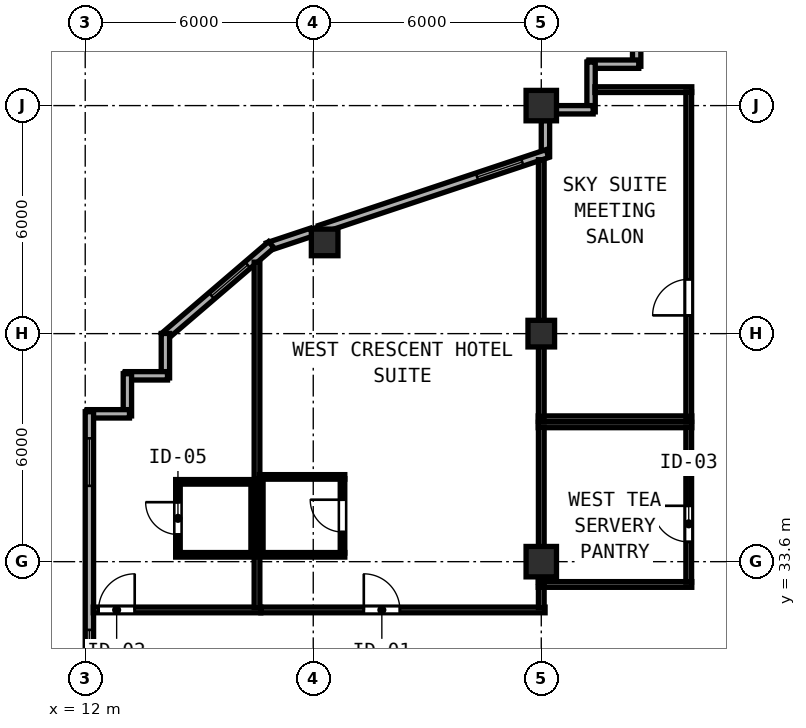
"""IFC4 building model, lengths in metres.
Left out: names, types, materials, properties, quantities, classifications, styles, units other than length and angle.
Written with IfcOpenShell. Run it as: python <this file> out.ifc"""

import sys

from ifc_helpers import new_model, si_unit, direction, frame, frame_2d, origin, origin_2d, place, context, subcontext, project, spatial, rectangle, hollow_rectangle, extrude, element, fill, save


model = new_model("IFC4")
c1 = context("Model", 3, precision=1e-05, world=origin(), true_north=direction((0.0, 1.0)))
c2 = subcontext(c1, "Body", "Model", "MODEL_VIEW")
j1 = project(units=[si_unit("LENGTHUNIT", "METRE"), si_unit("PLANEANGLEUNIT", "RADIAN")], contexts=[c1])
p1 = place(None, origin())
s1 = spatial("IfcSite", under=j1, at=p1, CompositionType="ELEMENT")
p2 = place(p1, origin())
s2 = spatial("IfcBuilding", under=s1, at=p2, CompositionType="ELEMENT")
p3 = place(p2, frame((0.0, 0.0, 262.15)))
s3 = spatial("IfcBuildingStorey", under=s2, at=p3, CompositionType="ELEMENT", Elevation=262.15)
for number, where, z_axis, x_axis in (
    (1, (24.0, 33.6, 0.0), (0.0, 0.0, 1.0), (1.0, 0.0, 0.0)),
    (2, (24.0, 45.6, 0.0), (0.0, 0.0, 1.0), (1.0, 0.0, 0.0)),
):
    element("IfcColumn", number, at=place(p3, frame(where, z_axis=z_axis, x_axis=x_axis)), inside=s3, PredefinedType="COLUMN", context=c2, shape_type="SweptSolid", body=[
        extrude(hollow_rectangle(XDim=0.8, YDim=0.8, WallThickness=0.03, at=origin_2d()), origin(), (0.0, 0.0, 1.0), 3.85),
    ])
for number, where, z_axis, x_axis in (
    (3, (24.0, 39.6, 0.0), (0.0, 0.0, 1.0), (1.0, 0.0, 0.0)),
    (4, (18.3, 42.0, 0.0), (0.0, 0.0, 1.0), (1.0, 0.0, 0.0)),
):
    element("IfcColumn", number, at=place(p3, frame(where, z_axis=z_axis, x_axis=x_axis)), inside=s3, PredefinedType="COLUMN", context=c2, shape_type="SweptSolid", body=[
        extrude(hollow_rectangle(XDim=0.7, YDim=0.7, WallThickness=0.026, at=origin_2d()), origin(), (0.0, 0.0, 1.0), 3.85),
    ])
p4 = place(p3, frame((26.51, 48.0, 0.0), z_axis=(0.0, 0.0, 1.0), x_axis=(0.0, -1.0, 0.0)))
e5 = element("IfcWall", 5, at=p4, inside=s3, PredefinedType="SOLIDWALL", context=c2, shape_type="SweptSolid", body=[
    extrude(rectangle(XDim=1.365, YDim=0.22, at=frame_2d((0.683, 0.0))), origin(), (0.0, 0.0, 1.0), 3.67),
])
for number, where, z_axis, x_axis in (
    (6, (26.565, 46.69, 0.0), (0.0, 0.0, 1.0), (-1.0, 0.0, 0.0)),
    (7, (25.31, 46.745, 0.0), (0.0, 0.0, 1.0), (0.0, -1.0, 0.0)),
):
    element("IfcWall", number, at=place(p3, frame(where, z_axis=z_axis, x_axis=x_axis)), inside=s3, PredefinedType="SOLIDWALL", context=c2, shape_type="SweptSolid", body=[
        extrude(rectangle(XDim=1.31, YDim=0.22, at=frame_2d((0.655, 0.0))), origin(), (0.0, 0.0, 1.0), 3.67),
    ])
p5 = place(p3, frame((25.365, 45.49, 0.0), z_axis=(0.0, 0.0, 1.0), x_axis=(-1.0, 0.0, 0.0)))
e8 = element("IfcWall", 8, at=p5, inside=s3, PredefinedType="SOLIDWALL", context=c2, shape_type="SweptSolid", body=[
    extrude(rectangle(XDim=0.973, YDim=0.22, at=frame_2d((0.486, 0.0))), origin(), (0.0, 0.0, 1.0), 3.67),
])
p6 = place(p3, frame((24.11, 45.208, 0.0), z_axis=(0.0, 0.0, 1.0), x_axis=(0.0, -1.0, 0.0)))
e9 = element("IfcWall", 9, at=p6, inside=s3, PredefinedType="SOLIDWALL", context=c2, shape_type="SweptSolid", body=[
    extrude(rectangle(XDim=0.942, YDim=0.22, at=frame_2d((0.471, 0.0))), origin(), (0.0, 0.0, 1.0), 3.315),
])
p7 = place(p3, frame((24.162, 44.338, 0.0), z_axis=(0.0, 0.0, 1.0), x_axis=(-0.948687165594, -0.31621616315, 0.0)))
e10 = element("IfcWall", 10, at=p7, inside=s3, PredefinedType="SOLIDWALL", context=c2, shape_type="SweptSolid", body=[
    extrude(rectangle(XDim=6.312, YDim=0.22, at=frame_2d((3.156, 0.0))), origin(), (0.0, 0.0, 1.0), 3.315),
])
p8 = place(p7, frame((0.7, 0.0, 0.85)))
e11 = element("IfcOpeningElement", 11, at=p8, cuts=e10, PredefinedType="OPENING", context=c2, shape_type="SweptSolid", body=[
    extrude(rectangle(XDim=1.25, YDim=1.95, at=frame_2d((0.625, 0.975))), frame((0.0, 0.12, 0.0), z_axis=(0.0, -1.0, 0.0), x_axis=(1.0, 0.0, 0.0)), (0.0, 0.0, 1.0), 0.24),
])
p9 = place(p3, frame((17.958, 42.27, 0.0), z_axis=(0.0, 0.0, 1.0), x_axis=(-0.948683298051, -0.316227766017, 0.0)))
e12 = element("IfcWall", 12, at=p9, inside=s3, PredefinedType="SOLIDWALL", context=c2, shape_type="SweptSolid", body=[
    extrude(rectangle(XDim=1.218, YDim=0.22, at=frame_2d((0.609, 0.0))), origin(), (0.0, 0.0, 1.0), 3.67),
])
p10 = place(p3, frame((16.897, 41.938, 0.0), z_axis=(0.0, 0.0, 1.0), x_axis=(-0.759279729622, -0.650764390686, 0.0)))
e13 = element("IfcWall", 13, at=p10, inside=s3, PredefinedType="SOLIDWALL", context=c2, shape_type="SweptSolid", body=[
    extrude(rectangle(XDim=3.726, YDim=0.22, at=frame_2d((1.863, 0.0))), origin(), (0.0, 0.0, 1.0), 3.67),
])
p11 = place(p10, frame((0.819, 0.0, 0.85)))
e14 = element("IfcOpeningElement", 14, at=p11, cuts=e13, PredefinedType="OPENING", context=c2, shape_type="SweptSolid", body=[
    extrude(rectangle(XDim=1.25, YDim=1.95, at=frame_2d((0.625, 0.975))), frame((0.0, 0.12, 0.0), z_axis=(0.0, -1.0, 0.0), x_axis=(1.0, 0.0, 0.0)), (0.0, 0.0, 1.0), 0.24),
])
p12 = place(p3, frame((14.11, 39.604, 0.0), z_axis=(0.0, 0.0, 1.0), x_axis=(0.0, -1.0, 0.0)))
e15 = element("IfcWall", 15, at=p12, inside=s3, PredefinedType="SOLIDWALL", context=c2, shape_type="SweptSolid", body=[
    extrude(rectangle(XDim=1.169, YDim=0.22, at=frame_2d((0.585, 0.0))), origin(), (0.0, 0.0, 1.0), 3.67),
])
p13 = place(p3, frame((14.165, 38.49, 0.0), z_axis=(0.0, 0.0, 1.0), x_axis=(-1.0, 0.0, 0.0)))
e16 = element("IfcWall", 16, at=p13, inside=s3, PredefinedType="SOLIDWALL", context=c2, shape_type="SweptSolid", body=[
    extrude(rectangle(XDim=1.11, YDim=0.22, at=frame_2d((0.555, 0.0))), origin(), (0.0, 0.0, 1.0), 3.67),
])
p14 = place(p3, frame((13.11, 38.545, 0.0), z_axis=(0.0, 0.0, 1.0), x_axis=(0.0, -1.0, 0.0)))
e17 = element("IfcWall", 17, at=p14, inside=s3, PredefinedType="SOLIDWALL", context=c2, shape_type="SweptSolid", body=[
    extrude(rectangle(XDim=1.11, YDim=0.22, at=frame_2d((0.555, 0.0))), origin(), (0.0, 0.0, 1.0), 3.67),
])
p15 = place(p3, frame((13.165, 37.49, 0.0), z_axis=(0.0, 0.0, 1.0), x_axis=(-1.0, 0.0, 0.0)))
e18 = element("IfcWall", 18, at=p15, inside=s3, PredefinedType="SOLIDWALL", context=c2, shape_type="SweptSolid", body=[
    extrude(rectangle(XDim=1.11, YDim=0.22, at=frame_2d((0.555, 0.0))), origin(), (0.0, 0.0, 1.0), 3.67),
])
p16 = place(p3, frame((12.11, 37.545, 0.0), z_axis=(0.0, 0.0, 1.0), x_axis=(0.0, -1.0, 0.0)))
e19 = element("IfcWall", 19, at=p16, inside=s3, PredefinedType="SOLIDWALL", context=c2, shape_type="SweptSolid", body=[
    extrude(rectangle(XDim=21.145, YDim=0.22, at=frame_2d((10.573, 0.0))), origin(), (0.0, 0.0, 1.0), 3.67),
])
p17 = place(p16, frame((0.7, 0.0, 0.85)))
e20 = element("IfcOpeningElement", 20, at=p17, cuts=e19, PredefinedType="OPENING", context=c2, shape_type="SweptSolid", body=[
    extrude(rectangle(XDim=1.25, YDim=1.95, at=frame_2d((0.625, 0.975))), frame((0.0, 0.12, 0.0), z_axis=(0.0, -1.0, 0.0), x_axis=(1.0, 0.0, 0.0)), (0.0, 0.0, 1.0), 0.24),
])
p18 = place(p16, frame((5.74, 0.0, 0.85)))
e21 = element("IfcOpeningElement", 21, at=p18, cuts=e19, PredefinedType="OPENING", context=c2, shape_type="SweptSolid", body=[
    extrude(rectangle(XDim=1.25, YDim=1.95, at=frame_2d((0.625, 0.975))), frame((0.0, 0.12, 0.0), z_axis=(0.0, -1.0, 0.0), x_axis=(1.0, 0.0, 0.0)), (0.0, 0.0, 1.0), 0.24),
])
p19 = place(p16, frame((11.5, 0.0, 0.85)))
e22 = element("IfcOpeningElement", 22, at=p19, cuts=e19, PredefinedType="OPENING", context=c2, shape_type="SweptSolid", body=[
    extrude(rectangle(XDim=1.25, YDim=1.95, at=frame_2d((0.625, 0.975))), frame((0.0, 0.12, 0.0), z_axis=(0.0, -1.0, 0.0), x_axis=(1.0, 0.0, 0.0)), (0.0, 0.0, 1.0), 0.24),
])
p20 = place(p16, frame((16.9, 0.0, 0.85)))
e23 = element("IfcOpeningElement", 23, at=p20, cuts=e19, PredefinedType="OPENING", context=c2, shape_type="SweptSolid", body=[
    extrude(rectangle(XDim=1.25, YDim=1.95, at=frame_2d((0.625, 0.975))), frame((0.0, 0.12, 0.0), z_axis=(0.0, -1.0, 0.0), x_axis=(1.0, 0.0, 0.0)), (0.0, 0.0, 1.0), 0.24),
])
for number, where, z_axis, x_axis in (
    (24, (23.92, 37.2, 0.0), (0.0, 0.0, 1.0), (1.0, 0.0, 0.0)),
    (25, (23.92, 33.0, 0.0), (0.0, 0.0, 1.0), (1.0, 0.0, 0.0)),
):
    element("IfcWall", number, at=place(p3, frame(where, z_axis=z_axis, x_axis=x_axis)), inside=s3, PredefinedType="PARTITIONING", context=c2, shape_type="SweptSolid", body=[
        extrude(rectangle(XDim=4.04, YDim=0.15, at=frame_2d((2.02, 0.0))), origin(), (0.0, 0.0, 1.0), 3.67),
    ])
p21 = place(p3, frame((24.0, 33.06, 0.0), z_axis=(0.0, 0.0, 1.0), x_axis=(0.0, 1.0, 0.0)))
e26 = element("IfcWall", 26, at=p21, inside=s3, PredefinedType="PARTITIONING", context=c2, shape_type="SweptSolid", body=[
    extrude(rectangle(XDim=4.08, YDim=0.15, at=frame_2d((2.04, 0.0))), origin(), (0.0, 0.0, 1.0), 3.315),
])
p22 = place(p3, frame((27.88, 33.06, 0.0), z_axis=(0.0, 0.0, 1.0), x_axis=(0.0, 1.0, 0.0)))
e27 = element("IfcWall", 27, at=p22, inside=s3, PredefinedType="PARTITIONING", context=c2, shape_type="SweptSolid", body=[
    extrude(rectangle(XDim=4.08, YDim=0.15, at=frame_2d((2.04, 0.0))), origin(), (0.0, 0.0, 1.0), 3.67),
])
p23 = place(p22, frame((2.01, 0.0, 0.0), z_axis=(0.0, 0.0, 1.0), x_axis=(-1.0, 0.0, 0.0)))
e28 = element("IfcOpeningElement", 28, at=p23, cuts=e27, PredefinedType="OPENING", context=c2, shape_type="SweptSolid", body=[
    extrude(rectangle(XDim=0.95, YDim=2.12, at=frame_2d((0.475, 1.06))), frame((0.0, 0.085, 0.0), z_axis=(0.0, -1.0, 0.0), x_axis=(1.0, 0.0, 0.0)), (0.0, 0.0, 1.0), 0.17),
])
p24 = place(p3, frame((25.412, 46.02, 0.0), z_axis=(0.0, 0.0, 1.0), x_axis=(1.0, 0.0, 0.0)))
e29 = element("IfcWall", 29, at=p24, inside=s3, PredefinedType="PARTITIONING", context=c2, shape_type="SweptSolid", body=[
    extrude(rectangle(XDim=2.548, YDim=0.15, at=frame_2d((1.274, 0.0))), origin(), (0.0, 0.0, 1.0), 3.67),
])
p25 = place(p3, frame((23.92, 37.36, 0.0), z_axis=(0.0, 0.0, 1.0), x_axis=(1.0, 0.0, 0.0)))
e30 = element("IfcWall", 30, at=p25, inside=s3, PredefinedType="PARTITIONING", context=c2, shape_type="SweptSolid", body=[
    extrude(rectangle(XDim=4.04, YDim=0.15, at=frame_2d((2.02, 0.0))), origin(), (0.0, 0.0, 1.0), 3.67),
])
p26 = place(p3, frame((24.0, 37.42, 0.0), z_axis=(0.0, 0.0, 1.0), x_axis=(0.0, 1.0, 0.0)))
e31 = element("IfcWall", 31, at=p26, inside=s3, PredefinedType="PARTITIONING", context=c2, shape_type="SweptSolid", body=[
    extrude(rectangle(XDim=6.757, YDim=0.15, at=frame_2d((3.378, 0.0))), origin(), (0.0, 0.0, 1.0), 3.315),
])
p27 = place(p3, frame((27.88, 37.42, 0.0), z_axis=(0.0, 0.0, 1.0), x_axis=(0.0, 1.0, 0.0)))
e32 = element("IfcWall", 32, at=p27, inside=s3, PredefinedType="PARTITIONING", context=c2, shape_type="SweptSolid", body=[
    extrude(rectangle(XDim=8.54, YDim=0.15, at=frame_2d((4.27, 0.0))), origin(), (0.0, 0.0, 1.0), 3.67),
])
p28 = place(p27, frame((3.61, 0.0, 0.0), z_axis=(0.0, 0.0, 1.0), x_axis=(-1.0, 0.0, 0.0)))
e33 = element("IfcOpeningElement", 33, at=p28, cuts=e32, PredefinedType="OPENING", context=c2, shape_type="SweptSolid", body=[
    extrude(rectangle(XDim=0.95, YDim=2.12, at=frame_2d((0.475, 1.06))), frame((0.0, 0.085, 0.0), z_axis=(0.0, -1.0, 0.0), x_axis=(1.0, 0.0, 0.0)), (0.0, 0.0, 1.0), 0.17),
])
p29 = place(p3, frame((12.212, 32.33, 0.0), z_axis=(0.0, 0.0, 1.0), x_axis=(1.0, 0.0, 0.0)))
e34 = element("IfcWall", 34, at=p29, inside=s3, PredefinedType="PARTITIONING", context=c2, shape_type="SweptSolid", body=[
    extrude(rectangle(XDim=4.408, YDim=0.15, at=frame_2d((2.204, 0.0))), origin(), (0.0, 0.0, 1.0), 3.67),
])
p30 = place(p29, frame((0.14, 0.0, 0.0)))
e35 = element("IfcOpeningElement", 35, at=p30, cuts=e34, PredefinedType="OPENING", context=c2, shape_type="SweptSolid", body=[
    extrude(rectangle(XDim=0.95, YDim=2.15, at=frame_2d((0.475, 1.075))), frame((0.0, 0.085, 0.0), z_axis=(0.0, -1.0, 0.0), x_axis=(1.0, 0.0, 0.0)), (0.0, 0.0, 1.0), 0.17),
])
p31 = place(p3, frame((16.52, 32.39, 0.0), z_axis=(0.0, 0.0, 1.0), x_axis=(0.0, 1.0, 0.0)))
e36 = element("IfcWall", 36, at=p31, inside=s3, PredefinedType="PARTITIONING", context=c2, shape_type="SweptSolid", body=[
    extrude(rectangle(XDim=9.091, YDim=0.15, at=frame_2d((4.545, 0.0))), origin(), (0.0, 0.0, 1.0), 3.67),
])
for number, where, z_axis, x_axis in (
    (37, (14.38, 35.7, 0.0), (0.0, 0.0, 1.0), (1.0, 0.0, 0.0)),
    (38, (14.38, 33.78, 0.0), (0.0, 0.0, 1.0), (1.0, 0.0, 0.0)),
):
    element("IfcWall", number, at=place(p3, frame(where, z_axis=z_axis, x_axis=x_axis)), inside=s3, PredefinedType="PARTITIONING", context=c2, shape_type="SweptSolid", body=[
        extrude(rectangle(XDim=2.08, YDim=0.12, at=frame_2d((1.04, 0.0))), origin(), (0.0, 0.0, 1.0), 3.67),
    ])
p32 = place(p3, frame((14.44, 33.825, 0.0), z_axis=(0.0, 0.0, 1.0), x_axis=(0.0, 1.0, 0.0)))
e39 = element("IfcWall", 39, at=p32, inside=s3, PredefinedType="PARTITIONING", context=c2, shape_type="SweptSolid", body=[
    extrude(rectangle(XDim=1.83, YDim=0.12, at=frame_2d((0.915, 0.0))), origin(), (0.0, 0.0, 1.0), 3.67),
])
p33 = place(p32, frame((1.34, 0.0, 0.0), z_axis=(0.0, 0.0, 1.0), x_axis=(-1.0, 0.0, 0.0)))
e40 = element("IfcOpeningElement", 40, at=p33, cuts=e39, PredefinedType="OPENING", context=c2, shape_type="SweptSolid", body=[
    extrude(rectangle(XDim=0.85, YDim=2.1, at=frame_2d((0.425, 1.05))), frame((0.0, 0.07, 0.0), z_axis=(0.0, -1.0, 0.0), x_axis=(1.0, 0.0, 0.0)), (0.0, 0.0, 1.0), 0.14),
])
p34 = place(p3, frame((16.42, 33.825, 0.0), z_axis=(0.0, 0.0, 1.0), x_axis=(0.0, 1.0, 0.0)))
e41 = element("IfcWall", 41, at=p34, inside=s3, PredefinedType="PARTITIONING", context=c2, shape_type="SweptSolid", body=[
    extrude(rectangle(XDim=1.83, YDim=0.12, at=frame_2d((0.915, 0.0))), origin(), (0.0, 0.0, 1.0), 3.67),
])
p35 = place(p3, frame((16.622, 32.33, 0.0), z_axis=(0.0, 0.0, 1.0), x_axis=(1.0, 0.0, 0.0)))
e42 = element("IfcWall", 42, at=p35, inside=s3, PredefinedType="PARTITIONING", context=c2, shape_type="SweptSolid", body=[
    extrude(rectangle(XDim=7.478, YDim=0.15, at=frame_2d((3.739, 0.0))), origin(), (0.0, 0.0, 1.0), 3.67),
])
p36 = place(p35, frame((2.708, 0.0, 0.0)))
e43 = element("IfcOpeningElement", 43, at=p36, cuts=e42, PredefinedType="OPENING", context=c2, shape_type="SweptSolid", body=[
    extrude(rectangle(XDim=0.95, YDim=2.18, at=frame_2d((0.475, 1.09))), frame((0.0, 0.085, 0.0), z_axis=(0.0, -1.0, 0.0), x_axis=(1.0, 0.0, 0.0)), (0.0, 0.0, 1.0), 0.17),
])
p37 = place(p3, frame((24.0, 32.39, 0.0), z_axis=(0.0, 0.0, 1.0), x_axis=(0.0, 1.0, 0.0)))
e44 = element("IfcWall", 44, at=p37, inside=s3, PredefinedType="PARTITIONING", context=c2, shape_type="SweptSolid", body=[
    extrude(rectangle(XDim=0.55, YDim=0.15, at=frame_2d((0.275, 0.0))), origin(), (0.0, 0.0, 1.0), 3.315),
])
for number, where, z_axis, x_axis in (
    (45, (16.58, 35.83, 0.0), (0.0, 0.0, 1.0), (1.0, 0.0, 0.0)),
    (46, (16.58, 33.78, 0.0), (0.0, 0.0, 1.0), (1.0, 0.0, 0.0)),
):
    element("IfcWall", number, at=place(p3, frame(where, z_axis=z_axis, x_axis=x_axis)), inside=s3, PredefinedType="PARTITIONING", context=c2, shape_type="SweptSolid", body=[
        extrude(rectangle(XDim=2.25, YDim=0.12, at=frame_2d((1.125, 0.0))), origin(), (0.0, 0.0, 1.0), 3.67),
    ])
p38 = place(p3, frame((16.62, 33.825, 0.0), z_axis=(0.0, 0.0, 1.0), x_axis=(0.0, 1.0, 0.0)))
e47 = element("IfcWall", 47, at=p38, inside=s3, PredefinedType="PARTITIONING", context=c2, shape_type="SweptSolid", body=[
    extrude(rectangle(XDim=1.96, YDim=0.12, at=frame_2d((0.98, 0.0))), origin(), (0.0, 0.0, 1.0), 3.67),
])
p39 = place(p3, frame((18.77, 33.825, 0.0), z_axis=(0.0, 0.0, 1.0), x_axis=(0.0, 1.0, 0.0)))
e48 = element("IfcWall", 48, at=p39, inside=s3, PredefinedType="PARTITIONING", context=c2, shape_type="SweptSolid", body=[
    extrude(rectangle(XDim=1.96, YDim=0.12, at=frame_2d((0.98, 0.0))), origin(), (0.0, 0.0, 1.0), 3.67),
])
p40 = place(p39, frame((0.555, 0.0, 0.0)))
e49 = element("IfcOpeningElement", 49, at=p40, cuts=e48, PredefinedType="OPENING", context=c2, shape_type="SweptSolid", body=[
    extrude(rectangle(XDim=0.85, YDim=2.1, at=frame_2d((0.425, 1.05))), frame((0.0, 0.07, 0.0), z_axis=(0.0, -1.0, 0.0), x_axis=(1.0, 0.0, 0.0)), (0.0, 0.0, 1.0), 0.14),
])
p41 = place(p8, origin())
e50 = element("IfcWindow", 50, at=p41, inside=s3, PartitioningType="SINGLE_PANEL", PredefinedType="WINDOW", context=c2, shape_type="SweptSolid", body=[
    extrude(rectangle(XDim=1.25, YDim=1.95, at=frame_2d((0.625, 0.975))), frame((0.0, 0.03, 0.0), z_axis=(0.0, -1.0, 0.0), x_axis=(1.0, 0.0, 0.0)), (0.0, 0.0, 1.0), 0.06),
])
fill(e11, e50)
p42 = place(p11, origin())
e51 = element("IfcWindow", 51, at=p42, inside=s3, PartitioningType="SINGLE_PANEL", PredefinedType="WINDOW", context=c2, shape_type="SweptSolid", body=[
    extrude(rectangle(XDim=1.25, YDim=1.95, at=frame_2d((0.625, 0.975))), frame((0.0, 0.03, 0.0), z_axis=(0.0, -1.0, 0.0), x_axis=(1.0, 0.0, 0.0)), (0.0, 0.0, 1.0), 0.06),
])
fill(e14, e51)
p43 = place(p17, origin())
e52 = element("IfcWindow", 52, at=p43, inside=s3, PartitioningType="SINGLE_PANEL", PredefinedType="WINDOW", context=c2, shape_type="SweptSolid", body=[
    extrude(rectangle(XDim=1.25, YDim=1.95, at=frame_2d((0.625, 0.975))), frame((0.0, 0.03, 0.0), z_axis=(0.0, -1.0, 0.0), x_axis=(1.0, 0.0, 0.0)), (0.0, 0.0, 1.0), 0.06),
])
fill(e20, e52)
p44 = place(p18, origin())
e53 = element("IfcWindow", 53, at=p44, inside=s3, PartitioningType="SINGLE_PANEL", PredefinedType="WINDOW", context=c2, shape_type="SweptSolid", body=[
    extrude(rectangle(XDim=1.25, YDim=1.95, at=frame_2d((0.625, 0.975))), frame((0.0, 0.03, 0.0), z_axis=(0.0, -1.0, 0.0), x_axis=(1.0, 0.0, 0.0)), (0.0, 0.0, 1.0), 0.06),
])
fill(e21, e53)
p45 = place(p23, origin())
e54 = element("IfcDoor", 54, at=p45, inside=s3, OperationType="SINGLE_SWING_LEFT", PredefinedType="DOOR", context=c2, shape_type="SweptSolid", body=[
    extrude(rectangle(XDim=0.95, YDim=2.12, at=frame_2d((0.475, 1.06))), frame((0.0, 0.025, 0.0), z_axis=(0.0, -1.0, 0.0), x_axis=(1.0, 0.0, 0.0)), (0.0, 0.0, 1.0), 0.05),
])
fill(e28, e54)
p46 = place(p28, origin())
e55 = element("IfcDoor", 55, at=p46, inside=s3, OperationType="SINGLE_SWING_RIGHT", PredefinedType="DOOR", context=c2, shape_type="SweptSolid", body=[
    extrude(rectangle(XDim=0.95, YDim=2.12, at=frame_2d((0.475, 1.06))), frame((0.0, 0.025, 0.0), z_axis=(0.0, -1.0, 0.0), x_axis=(1.0, 0.0, 0.0)), (0.0, 0.0, 1.0), 0.05),
])
fill(e33, e55)
p47 = place(p30, origin())
e56 = element("IfcDoor", 56, at=p47, inside=s3, OperationType="SINGLE_SWING_RIGHT", PredefinedType="DOOR", context=c2, shape_type="SweptSolid", body=[
    extrude(rectangle(XDim=0.95, YDim=2.15, at=frame_2d((0.475, 1.075))), frame((0.0, 0.025, 0.0), z_axis=(0.0, -1.0, 0.0), x_axis=(1.0, 0.0, 0.0)), (0.0, 0.0, 1.0), 0.05),
])
fill(e35, e56)
p48 = place(p33, origin())
e57 = element("IfcDoor", 57, at=p48, inside=s3, OperationType="SINGLE_SWING_LEFT", PredefinedType="DOOR", context=c2, shape_type="SweptSolid", body=[
    extrude(rectangle(XDim=0.85, YDim=2.1, at=frame_2d((0.425, 1.05))), frame((0.0, 0.025, 0.0), z_axis=(0.0, -1.0, 0.0), x_axis=(1.0, 0.0, 0.0)), (0.0, 0.0, 1.0), 0.05),
])
fill(e40, e57)
p49 = place(p36, origin())
e58 = element("IfcDoor", 58, at=p49, inside=s3, OperationType="SINGLE_SWING_LEFT", PredefinedType="DOOR", context=c2, shape_type="SweptSolid", body=[
    extrude(rectangle(XDim=0.95, YDim=2.18, at=frame_2d((0.475, 1.09))), frame((0.0, 0.025, 0.0), z_axis=(0.0, -1.0, 0.0), x_axis=(1.0, 0.0, 0.0)), (0.0, 0.0, 1.0), 0.05),
])
fill(e43, e58)
p50 = place(p40, origin())
e59 = element("IfcDoor", 59, at=p50, inside=s3, OperationType="SINGLE_SWING_RIGHT", PredefinedType="DOOR", context=c2, shape_type="SweptSolid", body=[
    extrude(rectangle(XDim=0.85, YDim=2.1, at=frame_2d((0.425, 1.05))), frame((0.0, 0.025, 0.0), z_axis=(0.0, -1.0, 0.0), x_axis=(1.0, 0.0, 0.0)), (0.0, 0.0, 1.0), 0.05),
])
fill(e49, e59)
save(model, sys.argv[1])
